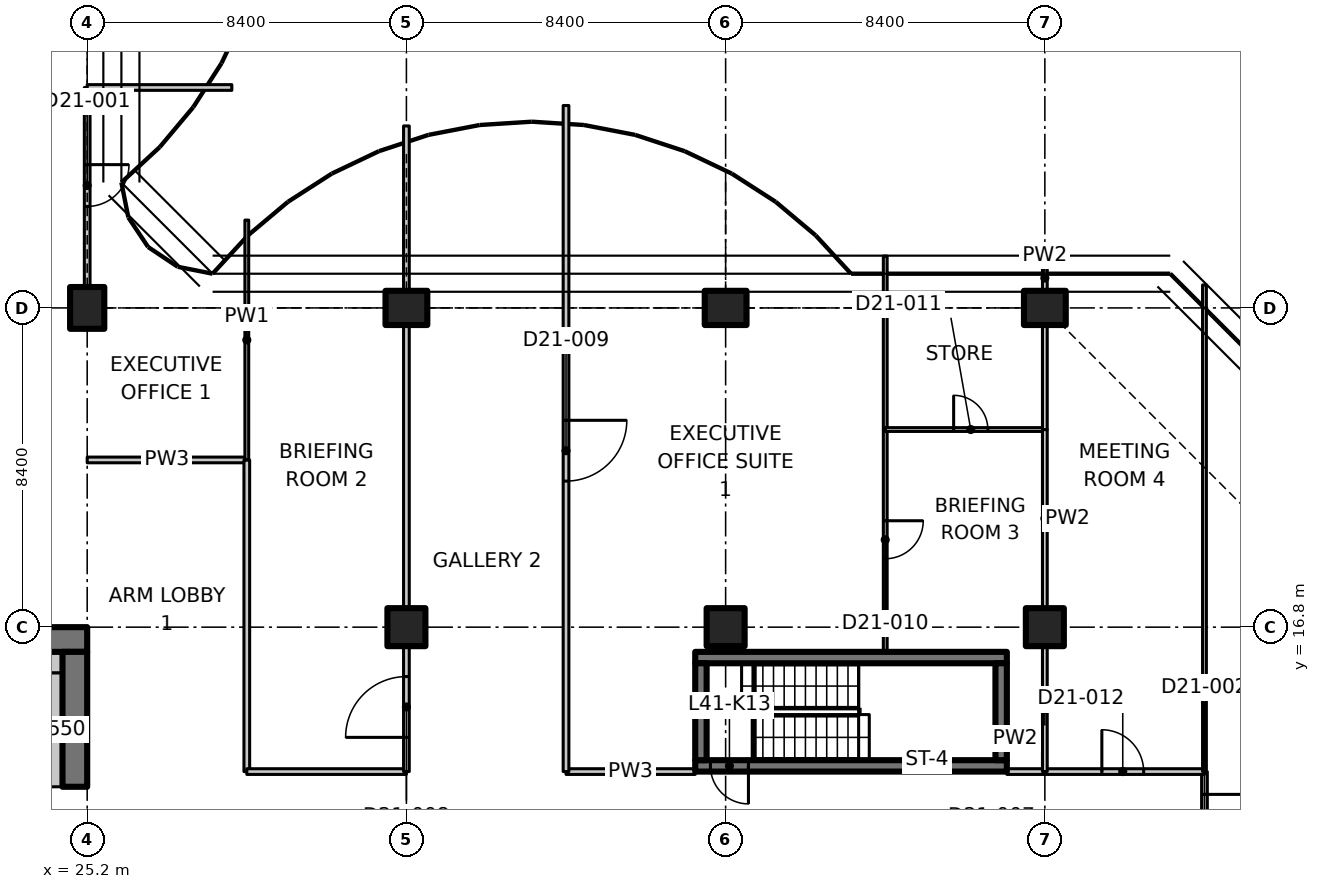
"""IFC4 building model, lengths in metres.
Left out: names, types, materials, properties, quantities, classifications, styles, units other than length and angle.
Written with IfcOpenShell. Run it as: python <this file> out.ifc"""

import sys

from ifc_helpers import new_model, si_unit, direction, frame, frame_2d, origin, origin_2d, place, context, subcontext, project, spatial, polyline, rectangle, outline, extrude, element, fill, save


model = new_model("IFC4")
c1 = context("Model", 3, precision=1e-05, world=origin(), true_north=direction((0.0, 1.0)))
c2 = subcontext(c1, "Body", "Model", "MODEL_VIEW")
j1 = project(units=[si_unit("LENGTHUNIT", "METRE"), si_unit("PLANEANGLEUNIT", "RADIAN")], contexts=[c1])
p1 = place(None, origin())
s1 = spatial("IfcSite", under=j1, at=p1, CompositionType="ELEMENT")
p2 = place(p1, origin())
s2 = spatial("IfcBuilding", under=s1, at=p2, CompositionType="ELEMENT")
p3 = place(p2, frame((0.0, 0.0, 166.8)))
s3 = spatial("IfcBuildingStorey", under=s2, at=p3, CompositionType="ELEMENT", Elevation=166.8)
p4 = place(p3, frame((25.2, 25.2, 0.0), z_axis=(0.0, 0.0, 1.0), x_axis=(1.0, 0.0, 0.0)))
e1 = element("IfcColumn", 1, at=p4, inside=s3, PredefinedType="COLUMN", context=c2, shape_type="SweptSolid", body=[
    extrude(rectangle(XDim=0.9, YDim=1.1, at=origin_2d()), origin(), (0.0, 0.0, 1.0), 3.35),
])
p5 = place(p3, frame((33.6, 16.8, 0.0), z_axis=(0.0, 0.0, 1.0), x_axis=(1.0, 0.0, 0.0)))
e2 = element("IfcColumn", 2, at=p5, inside=s3, PredefinedType="COLUMN", context=c2, shape_type="SweptSolid", body=[
    extrude(rectangle(XDim=1.0, YDim=1.0, at=origin_2d()), origin(), (0.0, 0.0, 1.0), 3.35),
])
p6 = place(p3, frame((33.6, 25.2, 0.0), z_axis=(0.0, 0.0, 1.0), x_axis=(0.0, 1.0, 0.0)))
e3 = element("IfcColumn", 3, at=p6, inside=s3, PredefinedType="COLUMN", context=c2, shape_type="SweptSolid", body=[
    extrude(rectangle(XDim=0.9, YDim=1.1, at=origin_2d()), origin(), (0.0, 0.0, 1.0), 3.35),
])
p7 = place(p3, frame((42.0, 16.8, 0.0), z_axis=(0.0, 0.0, 1.0), x_axis=(1.0, 0.0, 0.0)))
e4 = element("IfcColumn", 4, at=p7, inside=s3, PredefinedType="COLUMN", context=c2, shape_type="SweptSolid", body=[
    extrude(rectangle(XDim=1.0, YDim=1.0, at=origin_2d()), origin(), (0.0, 0.0, 1.0), 3.35),
])
p8 = place(p3, frame((42.0, 25.2, 0.0), z_axis=(0.0, 0.0, 1.0), x_axis=(0.0, 1.0, 0.0)))
e5 = element("IfcColumn", 5, at=p8, inside=s3, PredefinedType="COLUMN", context=c2, shape_type="SweptSolid", body=[
    extrude(rectangle(XDim=0.9, YDim=1.1, at=origin_2d()), origin(), (0.0, 0.0, 1.0), 3.35),
])
p9 = place(p3, frame((50.4, 16.8, 0.0), z_axis=(0.0, 0.0, 1.0), x_axis=(1.0, 0.0, 0.0)))
e6 = element("IfcColumn", 6, at=p9, inside=s3, PredefinedType="COLUMN", context=c2, shape_type="SweptSolid", body=[
    extrude(rectangle(XDim=1.0, YDim=1.0, at=origin_2d()), origin(), (0.0, 0.0, 1.0), 3.35),
])
p10 = place(p3, frame((50.4, 25.2, 0.0), z_axis=(0.0, 0.0, 1.0), x_axis=(0.0, 1.0, 0.0)))
e7 = element("IfcColumn", 7, at=p10, inside=s3, PredefinedType="COLUMN", context=c2, shape_type="SweptSolid", body=[
    extrude(rectangle(XDim=0.9, YDim=1.1, at=origin_2d()), origin(), (0.0, 0.0, 1.0), 3.35),
])
p11 = place(p3, frame((23.8, 16.475, 0.0), z_axis=(0.0, 0.0, 1.0), x_axis=(1.0, 0.0, 0.0)))
e8 = element("IfcWall", 8, at=p11, inside=s3, PredefinedType="SHEAR", context=c2, shape_type="SweptSolid", body=[
    extrude(rectangle(XDim=1.4, YDim=0.65, at=frame_2d((0.7, 0.0))), origin(), (0.0, 0.0, 1.0), 3.35),
])
p12 = place(p3, frame((24.875, 12.6, 0.0), z_axis=(0.0, 0.0, 1.0), x_axis=(0.0, 1.0, 0.0)))
e9 = element("IfcWall", 9, at=p12, inside=s3, PredefinedType="SHEAR", context=c2, shape_type="SweptSolid", body=[
    extrude(rectangle(XDim=3.55, YDim=0.65, at=frame_2d((1.775, 0.0))), origin(), (0.0, 0.0, 1.0), 3.35),
])
p13 = place(p3, frame((24.275, 12.6, 0.0), z_axis=(0.0, 0.0, 1.0), x_axis=(0.0, 1.0, 0.0)))
e10 = element("IfcWall", 10, at=p13, inside=s3, PredefinedType="PARTITIONING", context=c2, shape_type="SweptSolid", body=[
    extrude(rectangle(XDim=3.0, YDim=0.55, at=frame_2d((1.5, 0.0))), origin(), (0.0, 0.0, 1.0), 3.35),
])
p14 = place(p3, frame((23.8, 15.875, 0.0), z_axis=(0.0, 0.0, 1.0), x_axis=(1.0, 0.0, 0.0)))
e11 = element("IfcWall", 11, at=p14, inside=s3, PredefinedType="PARTITIONING", context=c2, shape_type="SweptSolid", body=[
    extrude(rectangle(XDim=0.75, YDim=0.55, at=frame_2d((0.375, 0.0))), origin(), (0.0, 0.0, 1.0), 3.35),
])
p15 = place(p3, frame((49.4, 13.15, 0.0), z_axis=(0.0, 0.0, 1.0), x_axis=(-1.0, 0.0, 0.0)))
e12 = element("IfcWall", 12, at=p15, inside=s3, PredefinedType="SHEAR", context=c2, shape_type="SweptSolid", body=[
    extrude(rectangle(XDim=8.2, YDim=0.3, at=frame_2d((4.1, 0.0))), origin(), (0.0, 0.0, 1.0), 3.35),
])
p16 = place(p15, frame((6.8, 0.0, 0.0)))
e13 = element("IfcOpeningElement", 13, at=p16, cuts=e12, PredefinedType="OPENING", context=c2, shape_type="SweptSolid", body=[
    extrude(rectangle(XDim=1.0, YDim=2.1, at=frame_2d((0.5, 1.05))), frame((0.0, 0.16, 0.0), z_axis=(0.0, -1.0, 0.0), x_axis=(1.0, 0.0, 0.0)), (0.0, 0.0, 1.0), 0.32),
])
p17 = place(p3, frame((41.2, 16.0, 0.0), z_axis=(0.0, 0.0, 1.0), x_axis=(1.0, 0.0, 0.0)))
e14 = element("IfcWall", 14, at=p17, inside=s3, PredefinedType="SHEAR", context=c2, shape_type="SweptSolid", body=[
    extrude(rectangle(XDim=8.2, YDim=0.3, at=frame_2d((4.1, 0.0))), origin(), (0.0, 0.0, 1.0), 3.35),
])
for number, where, z_axis, x_axis in (
    (15, (41.35, 13.3, 0.0), (0.0, 0.0, 1.0), (0.0, 1.0, 0.0)),
    (16, (49.25, 13.3, 0.0), (0.0, 0.0, 1.0), (0.0, 1.0, 0.0)),
):
    element("IfcWall", number, at=place(p3, frame(where, z_axis=z_axis, x_axis=x_axis)), inside=s3, PredefinedType="SHEAR", context=c2, shape_type="SweptSolid", body=[
        extrude(rectangle(XDim=2.55, YDim=0.3, at=frame_2d((1.275, 0.0))), origin(), (0.0, 0.0, 1.0), 3.35),
    ])
p18 = place(p3, frame((25.2, 21.2, 0.0), z_axis=(0.0, 0.0, 1.0), x_axis=(1.0, 0.0, 0.0)))
e17 = element("IfcWall", 17, at=p18, inside=s3, PredefinedType="PARTITIONING", context=c2, shape_type="SweptSolid", body=[
    extrude(rectangle(XDim=4.2, YDim=0.15, at=frame_2d((2.1, 0.0))), origin(), (0.0, 0.0, 1.0), 3.33),
])
p19 = place(p3, frame((29.4, 21.2, 0.0), z_axis=(0.0, 0.0, 1.0), x_axis=(0.0, -1.0, 0.0)))
e18 = element("IfcWall", 18, at=p19, inside=s3, PredefinedType="PARTITIONING", context=c2, shape_type="SweptSolid", body=[
    extrude(rectangle(XDim=8.2, YDim=0.15, at=frame_2d((4.1, 0.0))), origin(), (0.0, 0.0, 1.0), 3.33),
])
p20 = place(p3, frame((29.4, 27.511, 0.0), z_axis=(0.0, 0.0, 1.0), x_axis=(0.0, -1.0, 0.0)))
e19 = element("IfcWall", 19, at=p20, inside=s3, PredefinedType="PARTITIONING", context=c2, shape_type="SweptSolid", body=[
    extrude(outline(polyline([(0.0, 0.0), (6.311, 0.0), (6.311, 3.33), (2.761, 3.33), (2.759, 2.98), (1.863, 2.98), (1.861, 3.33), (0.236, 3.33), (0.0, 3.33), (0.0, 0.0)])), frame((0.0, 0.05, 0.0), z_axis=(0.0, -1.0, 0.0), x_axis=(1.0, 0.0, 0.0)), (0.0, 0.0, 1.0), 0.1),
])
p21 = place(p3, frame((25.2, 31.0, 0.0), z_axis=(0.0, 0.0, 1.0), x_axis=(0.0, -1.0, 0.0)))
e20 = element("IfcWall", 20, at=p21, inside=s3, PredefinedType="PARTITIONING", context=c2, shape_type="SweptSolid", body=[
    extrude(outline(polyline([(0.0, 0.0), (5.23, 0.0), (5.23, 2.98), (0.0, 2.98), (0.0, 0.0)])), frame((0.0, 0.075, 0.0), z_axis=(0.0, -1.0, 0.0), x_axis=(1.0, 0.0, 0.0)), (0.0, 0.0, 1.0), 0.15),
])
p22 = place(p21, frame((2.03, 0.0, 0.0)))
e21 = element("IfcOpeningElement", 21, at=p22, cuts=e20, PredefinedType="OPENING", context=c2, shape_type="SweptSolid", body=[
    extrude(rectangle(XDim=1.1, YDim=2.1, at=frame_2d((0.55, 1.05))), frame((0.0, 0.085, 0.0), z_axis=(0.0, -1.0, 0.0), x_axis=(1.0, 0.0, 0.0)), (0.0, 0.0, 1.0), 0.17),
])
p23 = place(p3, frame((25.2, 31.0, 0.0), z_axis=(0.0, 0.0, 1.0), x_axis=(1.0, 0.0, 0.0)))
e22 = element("IfcWall", 22, at=p23, inside=s3, PredefinedType="PARTITIONING", context=c2, shape_type="SweptSolid", body=[
    extrude(rectangle(XDim=3.806, YDim=0.15, at=frame_2d((1.903, 0.0))), origin(), (0.0, 0.0, 1.0), 2.98),
])
p24 = place(p3, frame((54.6, 13.0, 0.0), z_axis=(0.0, 0.0, 1.0), x_axis=(0.0, -1.0, 0.0)))
e23 = element("IfcWall", 23, at=p24, inside=s3, PredefinedType="PARTITIONING", context=c2, shape_type="SweptSolid", body=[
    extrude(rectangle(XDim=3.4, YDim=0.15, at=frame_2d((1.7, 0.0))), origin(), (0.0, 0.0, 1.0), 3.33),
])
p25 = place(p24, frame((0.6, 0.0, 0.0)))
e24 = element("IfcOpeningElement", 24, at=p25, cuts=e23, PredefinedType="OPENING", context=c2, shape_type="SweptSolid", body=[
    extrude(rectangle(XDim=2.0, YDim=2.4, at=frame_2d((1.0, 1.2))), frame((0.0, 0.085, 0.0), z_axis=(0.0, -1.0, 0.0), x_axis=(1.0, 0.0, 0.0)), (0.0, 0.0, 1.0), 0.17),
])
p26 = place(p3, frame((29.4, 13.0, 0.0), z_axis=(0.0, 0.0, 1.0), x_axis=(1.0, 0.0, 0.0)))
e25 = element("IfcWall", 25, at=p26, inside=s3, PredefinedType="PARTITIONING", context=c2, shape_type="SweptSolid", body=[
    extrude(rectangle(XDim=4.2, YDim=0.15, at=frame_2d((2.1, 0.0))), origin(), (0.0, 0.0, 1.0), 3.33),
])
p27 = place(p3, frame((37.8, 13.0, 0.0), z_axis=(0.0, 0.0, 1.0), x_axis=(1.0, 0.0, 0.0)))
e26 = element("IfcWall", 26, at=p27, inside=s3, PredefinedType="PARTITIONING", context=c2, shape_type="SweptSolid", body=[
    extrude(rectangle(XDim=3.4, YDim=0.15, at=frame_2d((1.7, 0.0))), origin(), (0.0, 0.0, 1.0), 3.33),
])
p28 = place(p3, frame((49.4, 13.0, 0.0), z_axis=(0.0, 0.0, 1.0), x_axis=(1.0, 0.0, 0.0)))
e27 = element("IfcWall", 27, at=p28, inside=s3, PredefinedType="PARTITIONING", context=c2, shape_type="SweptSolid", body=[
    extrude(rectangle(XDim=1.0, YDim=0.15, at=frame_2d((0.5, 0.0))), origin(), (0.0, 0.0, 1.0), 3.33),
])
p29 = place(p3, frame((50.4, 13.0, 0.0), z_axis=(0.0, 0.0, 1.0), x_axis=(1.0, 0.0, 0.0)))
e28 = element("IfcWall", 28, at=p29, inside=s3, PredefinedType="PARTITIONING", context=c2, shape_type="SweptSolid", body=[
    extrude(rectangle(XDim=4.2, YDim=0.15, at=frame_2d((2.1, 0.0))), origin(), (0.0, 0.0, 1.0), 3.33),
])
p30 = place(p29, frame((1.5, 0.0, 0.0)))
e29 = element("IfcOpeningElement", 29, at=p30, cuts=e28, PredefinedType="OPENING", context=c2, shape_type="SweptSolid", body=[
    extrude(rectangle(XDim=1.1, YDim=2.1, at=frame_2d((0.55, 1.05))), frame((0.0, 0.085, 0.0), z_axis=(0.0, -1.0, 0.0), x_axis=(1.0, 0.0, 0.0)), (0.0, 0.0, 1.0), 0.17),
])
p31 = place(p3, frame((54.6, 13.0, 0.0), z_axis=(0.0, 0.0, 1.0), x_axis=(0.0, 1.0, 0.0)))
e30 = element("IfcWall", 30, at=p31, inside=s3, PredefinedType="PARTITIONING", context=c2, shape_type="SweptSolid", body=[
    extrude(outline(polyline([(0.0, 0.0), (12.805, 0.0), (12.805, 3.33), (12.4, 3.33), (8.666, 3.33), (8.664, 2.98), (7.336, 2.98), (7.334, 3.33), (0.0, 3.33), (0.0, 0.0)])), frame((0.0, 0.05, 0.0), z_axis=(0.0, -1.0, 0.0), x_axis=(1.0, 0.0, 0.0)), (0.0, 0.0, 1.0), 0.1),
])
p32 = place(p3, frame((33.6, 13.0, 0.0), z_axis=(0.0, 0.0, 1.0), x_axis=(0.0, 1.0, 0.0)))
e31 = element("IfcWall", 31, at=p32, inside=s3, PredefinedType="PARTITIONING", context=c2, shape_type="SweptSolid", body=[
    extrude(rectangle(XDim=3.28, YDim=0.15, at=frame_2d((1.64, 0.0))), origin(), (0.0, 0.0, 1.0), 3.33),
])
p33 = place(p32, frame((0.9, 0.0, 0.0)))
e32 = element("IfcOpeningElement", 32, at=p33, cuts=e31, PredefinedType="OPENING", context=c2, shape_type="SweptSolid", body=[
    extrude(rectangle(XDim=1.6, YDim=2.1, at=frame_2d((0.8, 1.05))), frame((0.0, 0.085, 0.0), z_axis=(0.0, -1.0, 0.0), x_axis=(1.0, 0.0, 0.0)), (0.0, 0.0, 1.0), 0.17),
])
p34 = place(p3, frame((33.6, 17.32, 0.0), z_axis=(0.0, 0.0, 1.0), x_axis=(0.0, 1.0, 0.0)))
e33 = element("IfcWall", 33, at=p34, inside=s3, PredefinedType="PARTITIONING", context=c2, shape_type="SweptSolid", body=[
    extrude(rectangle(XDim=7.41, YDim=0.15, at=frame_2d((3.705, 0.0))), origin(), (0.0, 0.0, 1.0), 3.33),
])
p35 = place(p3, frame((33.6, 25.67, 0.0), z_axis=(0.0, 0.0, 1.0), x_axis=(0.0, 1.0, 0.0)))
e34 = element("IfcWall", 34, at=p35, inside=s3, PredefinedType="PARTITIONING", context=c2, shape_type="SweptSolid", body=[
    extrude(rectangle(XDim=4.318, YDim=0.15, at=frame_2d((2.159, 0.0))), origin(), (0.0, 0.0, 1.0), 2.98),
])
p36 = place(p3, frame((37.8, 30.526, 0.0), z_axis=(0.0, 0.0, 1.0), x_axis=(0.0, -1.0, 0.0)))
e35 = element("IfcWall", 35, at=p36, inside=s3, PredefinedType="PARTITIONING", context=c2, shape_type="SweptSolid", body=[
    extrude(outline(polyline([(0.0, 0.0), (17.526, 0.0), (17.526, 3.33), (5.776, 3.33), (5.774, 2.98), (4.878, 2.98), (4.876, 3.33), (0.283, 3.33), (0.0, 3.33), (0.0, 0.0)])), frame((0.0, 0.075, 0.0), z_axis=(0.0, -1.0, 0.0), x_axis=(1.0, 0.0, 0.0)), (0.0, 0.0, 1.0), 0.15),
])
p37 = place(p36, frame((8.283, 0.0, 0.0)))
e36 = element("IfcOpeningElement", 36, at=p37, cuts=e35, PredefinedType="OPENING", context=c2, shape_type="SweptSolid", body=[
    extrude(rectangle(XDim=1.6, YDim=2.1, at=frame_2d((0.8, 1.05))), frame((0.0, 0.085, 0.0), z_axis=(0.0, -1.0, 0.0), x_axis=(1.0, 0.0, 0.0)), (0.0, 0.0, 1.0), 0.17),
])
p38 = place(p3, frame((46.2, 22.0, 0.0), z_axis=(0.0, 0.0, 1.0), x_axis=(0.0, -1.0, 0.0)))
e37 = element("IfcWall", 37, at=p38, inside=s3, PredefinedType="PARTITIONING", context=c2, shape_type="SweptSolid", body=[
    extrude(rectangle(XDim=5.85, YDim=0.1, at=frame_2d((2.925, 0.0))), origin(), (0.0, 0.0, 1.0), 3.33),
])
p39 = place(p38, frame((2.4, 0.0, 0.0)))
e38 = element("IfcOpeningElement", 38, at=p39, cuts=e37, PredefinedType="OPENING", context=c2, shape_type="SweptSolid", body=[
    extrude(rectangle(XDim=1.0, YDim=2.1, at=frame_2d((0.5, 1.05))), frame((0.0, 0.06, 0.0), z_axis=(0.0, -1.0, 0.0), x_axis=(1.0, 0.0, 0.0)), (0.0, 0.0, 1.0), 0.12),
])
p40 = place(p3, frame((46.2, 26.565, 0.0), z_axis=(0.0, 0.0, 1.0), x_axis=(0.0, -1.0, 0.0)))
e39 = element("IfcWall", 39, at=p40, inside=s3, PredefinedType="PARTITIONING", context=c2, shape_type="SweptSolid", body=[
    extrude(rectangle(XDim=4.565, YDim=0.1, at=frame_2d((2.282, 0.0))), origin(), (0.0, 0.0, 1.0), 2.98),
])
p41 = place(p3, frame((46.2, 22.0, 0.0), z_axis=(0.0, 0.0, 1.0), x_axis=(1.0, 0.0, 0.0)))
e40 = element("IfcWall", 40, at=p41, inside=s3, PredefinedType="PARTITIONING", context=c2, shape_type="SweptSolid", body=[
    extrude(rectangle(XDim=4.2, YDim=0.1, at=frame_2d((2.1, 0.0))), origin(), (0.0, 0.0, 1.0), 3.33),
])
p42 = place(p41, frame((1.8, 0.0, 0.0)))
e41 = element("IfcOpeningElement", 41, at=p42, cuts=e40, PredefinedType="OPENING", context=c2, shape_type="SweptSolid", body=[
    extrude(rectangle(XDim=0.9, YDim=2.1, at=frame_2d((0.45, 1.05))), frame((0.0, 0.06, 0.0), z_axis=(0.0, -1.0, 0.0), x_axis=(1.0, 0.0, 0.0)), (0.0, 0.0, 1.0), 0.12),
])
p43 = place(p3, frame((50.4, 22.0, 0.0), z_axis=(0.0, 0.0, 1.0), x_axis=(0.0, -1.0, 0.0)))
e42 = element("IfcWall", 42, at=p43, inside=s3, PredefinedType="PARTITIONING", context=c2, shape_type="SweptSolid", body=[
    extrude(rectangle(XDim=4.68, YDim=0.125, at=frame_2d((2.34, 0.0))), origin(), (0.0, 0.0, 1.0), 3.33),
])
p44 = place(p3, frame((50.4, 16.28, 0.0), z_axis=(0.0, 0.0, 1.0), x_axis=(0.0, -1.0, 0.0)))
e43 = element("IfcWall", 43, at=p44, inside=s3, PredefinedType="PARTITIONING", context=c2, shape_type="SweptSolid", body=[
    extrude(rectangle(XDim=3.28, YDim=0.125, at=frame_2d((1.64, 0.0))), origin(), (0.0, 0.0, 1.0), 3.33),
])
p45 = place(p3, frame((50.4, 26.3, 0.0), z_axis=(0.0, 0.0, 1.0), x_axis=(0.0, -1.0, 0.0)))
e44 = element("IfcWall", 44, at=p45, inside=s3, PredefinedType="PARTITIONING", context=c2, shape_type="SweptSolid", body=[
    extrude(rectangle(XDim=0.63, YDim=0.125, at=frame_2d((0.315, 0.0))), origin(), (0.0, 0.0, 1.0), 3.33),
])
p46 = place(p3, frame((50.4, 24.73, 0.0), z_axis=(0.0, 0.0, 1.0), x_axis=(0.0, -1.0, 0.0)))
e45 = element("IfcWall", 45, at=p46, inside=s3, PredefinedType="PARTITIONING", context=c2, shape_type="SweptSolid", body=[
    extrude(rectangle(XDim=2.73, YDim=0.125, at=frame_2d((1.365, 0.0))), origin(), (0.0, 0.0, 1.0), 2.98),
])
p47 = place(p16, origin())
e46 = element("IfcDoor", 46, at=p47, inside=s3, OperationType="SINGLE_SWING_LEFT", PredefinedType="DOOR", context=c2, shape_type="SweptSolid", body=[
    extrude(rectangle(XDim=1.0, YDim=2.1, at=frame_2d((0.5, 1.05))), frame((0.0, 0.025, 0.0), z_axis=(0.0, -1.0, 0.0), x_axis=(1.0, 0.0, 0.0)), (0.0, 0.0, 1.0), 0.05),
])
fill(e13, e46)
p48 = place(p22, origin())
e47 = element("IfcDoor", 47, at=p48, inside=s3, OperationType="SINGLE_SWING_RIGHT", PredefinedType="DOOR", context=c2, shape_type="SweptSolid", body=[
    extrude(rectangle(XDim=1.1, YDim=2.1, at=frame_2d((0.55, 1.05))), frame((0.0, 0.025, 0.0), z_axis=(0.0, -1.0, 0.0), x_axis=(1.0, 0.0, 0.0)), (0.0, 0.0, 1.0), 0.05),
])
fill(e21, e47)
p49 = place(p25, origin())
e48 = element("IfcDoor", 48, at=p49, inside=s3, OperationType="DOUBLE_DOOR_SINGLE_SWING", PredefinedType="DOOR", context=c2, shape_type="SweptSolid", body=[
    extrude(rectangle(XDim=2.0, YDim=2.4, at=frame_2d((1.0, 1.2))), frame((0.0, 0.025, 0.0), z_axis=(0.0, -1.0, 0.0), x_axis=(1.0, 0.0, 0.0)), (0.0, 0.0, 1.0), 0.05),
])
fill(e24, e48)
p50 = place(p33, origin())
e49 = element("IfcDoor", 49, at=p50, inside=s3, OperationType="DOUBLE_DOOR_SINGLE_SWING", PredefinedType="DOOR", context=c2, shape_type="SweptSolid", body=[
    extrude(rectangle(XDim=1.6, YDim=2.1, at=frame_2d((0.8, 1.05))), frame((0.0, 0.025, 0.0), z_axis=(0.0, -1.0, 0.0), x_axis=(1.0, 0.0, 0.0)), (0.0, 0.0, 1.0), 0.05),
])
fill(e32, e49)
p51 = place(p37, origin())
e50 = element("IfcDoor", 50, at=p51, inside=s3, OperationType="DOUBLE_DOOR_SINGLE_SWING", PredefinedType="DOOR", context=c2, shape_type="SweptSolid", body=[
    extrude(rectangle(XDim=1.6, YDim=2.1, at=frame_2d((0.8, 1.05))), frame((0.0, 0.025, 0.0), z_axis=(0.0, -1.0, 0.0), x_axis=(1.0, 0.0, 0.0)), (0.0, 0.0, 1.0), 0.05),
])
fill(e36, e50)
p52 = place(p39, origin())
e51 = element("IfcDoor", 51, at=p52, inside=s3, OperationType="SINGLE_SWING_LEFT", PredefinedType="DOOR", context=c2, shape_type="SweptSolid", body=[
    extrude(rectangle(XDim=1.0, YDim=2.1, at=frame_2d((0.5, 1.05))), frame((0.0, 0.025, 0.0), z_axis=(0.0, -1.0, 0.0), x_axis=(1.0, 0.0, 0.0)), (0.0, 0.0, 1.0), 0.05),
])
fill(e38, e51)
p53 = place(p42, origin())
e52 = element("IfcDoor", 52, at=p53, inside=s3, OperationType="SINGLE_SWING_LEFT", PredefinedType="DOOR", context=c2, shape_type="SweptSolid", body=[
    extrude(rectangle(XDim=0.9, YDim=2.1, at=frame_2d((0.45, 1.05))), frame((0.0, 0.025, 0.0), z_axis=(0.0, -1.0, 0.0), x_axis=(1.0, 0.0, 0.0)), (0.0, 0.0, 1.0), 0.05),
])
fill(e41, e52)
p54 = place(p30, origin())
e53 = element("IfcDoor", 53, at=p54, inside=s3, OperationType="SINGLE_SWING_LEFT", PredefinedType="DOOR", context=c2, shape_type="SweptSolid", body=[
    extrude(rectangle(XDim=1.1, YDim=2.1, at=frame_2d((0.55, 1.05))), frame((0.0, 0.025, 0.0), z_axis=(0.0, -1.0, 0.0), x_axis=(1.0, 0.0, 0.0)), (0.0, 0.0, 1.0), 0.05),
])
fill(e29, e53)
save(model, sys.argv[1])
